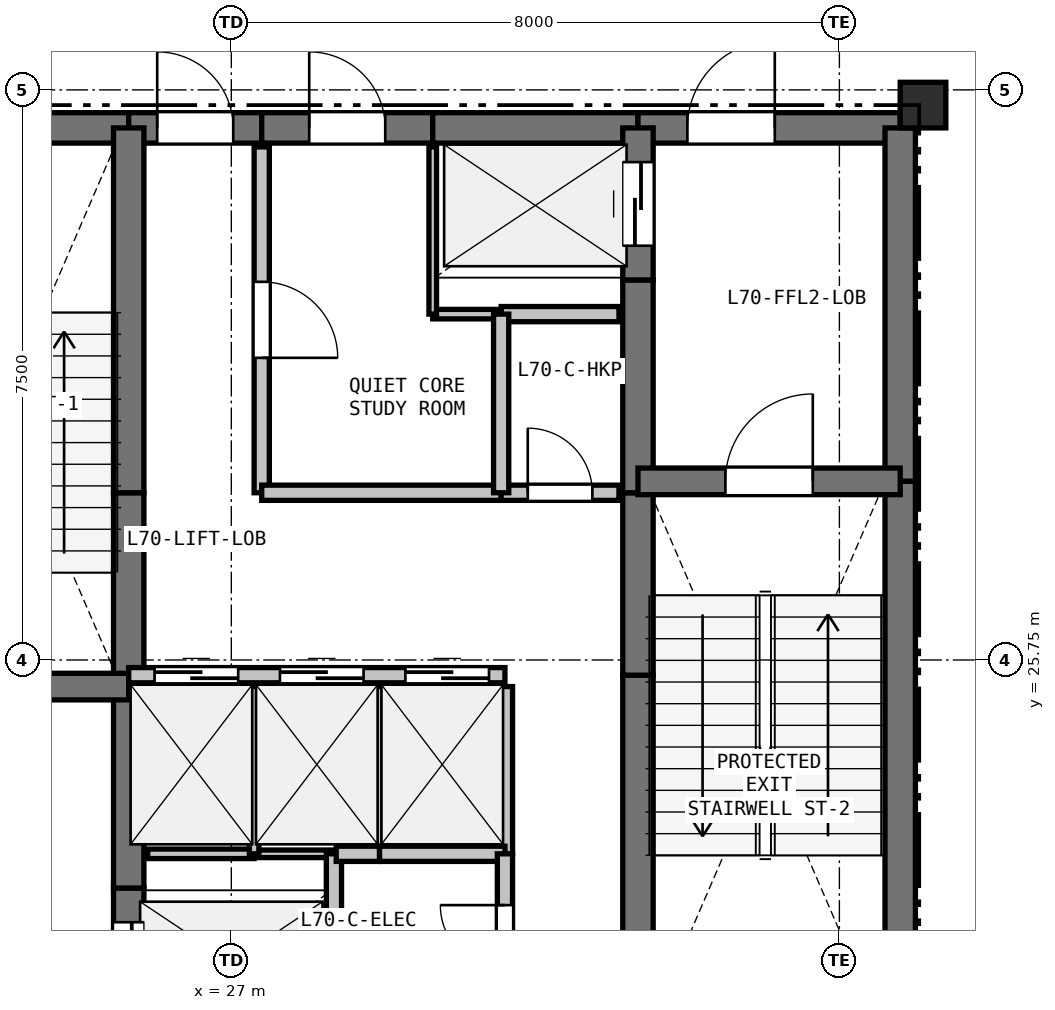
"""IFC4 building model, lengths in metres.
Left out: names, types, materials, properties, quantities, classifications, styles, units other than length and angle.
Written with IfcOpenShell. Run it as: python <this file> out.ifc"""

import sys

from ifc_helpers import new_model, si_unit, direction, frame, frame_2d, origin, origin_2d, place, context, subcontext, project, spatial, rectangle, extrude, element, fill, save


model = new_model("IFC4")
c1 = context("Model", 3, precision=1e-05, world=origin(), true_north=direction((0.0, 1.0)))
c2 = subcontext(c1, "Body", "Model", "MODEL_VIEW")
j1 = project(units=[si_unit("LENGTHUNIT", "METRE"), si_unit("PLANEANGLEUNIT", "RADIAN")], contexts=[c1])
p1 = place(None, origin())
s1 = spatial("IfcSite", under=j1, at=p1, CompositionType="ELEMENT")
p2 = place(p1, origin())
s2 = spatial("IfcBuilding", under=s1, at=p2, CompositionType="ELEMENT")
p3 = place(p2, frame((0.0, 0.0, 249.6)))
s3 = spatial("IfcBuildingStorey", under=s2, at=p3, CompositionType="ELEMENT", Elevation=249.6)
p4 = place(p3, frame((36.1, 33.05, 0.0), z_axis=(0.0, 0.0, 1.0), x_axis=(1.0, 0.0, 0.0)))
e1 = element("IfcColumn", 1, at=p4, inside=s3, PredefinedType="COLUMN", context=c2, shape_type="SweptSolid", body=[
    extrude(rectangle(XDim=0.6, YDim=0.6, at=origin_2d()), origin(), (0.0, 0.0, 1.0), 4.5),
])
p5 = place(p3, frame((22.2, 32.75, 0.0), z_axis=(0.0, 0.0, 1.0), x_axis=(1.0, 0.0, 0.0)))
e2 = element("IfcWall", 2, at=p5, inside=s3, PredefinedType="SHEAR", context=c2, shape_type="SweptSolid", body=[
    extrude(rectangle(XDim=3.45, YDim=0.4, at=frame_2d((1.725, 0.0))), origin(), (0.0, 0.0, 1.0), 4.22),
])
p6 = place(p3, frame((25.65, 32.75, 0.0), z_axis=(0.0, 0.0, 1.0), x_axis=(1.0, 0.0, 0.0)))
e3 = element("IfcWall", 3, at=p6, inside=s3, PredefinedType="SHEAR", context=c2, shape_type="SweptSolid", body=[
    extrude(rectangle(XDim=1.75, YDim=0.4, at=frame_2d((0.875, 0.0))), origin(), (0.0, 0.0, 1.0), 4.22),
])
p7 = place(p6, frame((0.375, 0.0, 0.0)))
e4 = element("IfcOpeningElement", 4, at=p7, cuts=e3, PredefinedType="OPENING", context=c2, shape_type="SweptSolid", body=[
    extrude(rectangle(XDim=1.0, YDim=2.15, at=frame_2d((0.5, 1.075))), frame((0.0, 0.21, 0.0), z_axis=(0.0, -1.0, 0.0), x_axis=(1.0, 0.0, 0.0)), (0.0, 0.0, 1.0), 0.42),
])
p8 = place(p3, frame((27.4, 32.75, 0.0), z_axis=(0.0, 0.0, 1.0), x_axis=(1.0, 0.0, 0.0)))
e5 = element("IfcWall", 5, at=p8, inside=s3, PredefinedType="SHEAR", context=c2, shape_type="SweptSolid", body=[
    extrude(rectangle(XDim=2.25, YDim=0.4, at=frame_2d((1.125, 0.0))), origin(), (0.0, 0.0, 1.0), 4.22),
])
p9 = place(p8, frame((0.625, 0.0, 0.0)))
e6 = element("IfcOpeningElement", 6, at=p9, cuts=e5, PredefinedType="OPENING", context=c2, shape_type="SweptSolid", body=[
    extrude(rectangle(XDim=1.0, YDim=2.15, at=frame_2d((0.5, 1.075))), frame((0.0, 0.21, 0.0), z_axis=(0.0, -1.0, 0.0), x_axis=(1.0, 0.0, 0.0)), (0.0, 0.0, 1.0), 0.42),
])
p10 = place(p3, frame((29.65, 32.75, 0.0), z_axis=(0.0, 0.0, 1.0), x_axis=(1.0, 0.0, 0.0)))
e7 = element("IfcWall", 7, at=p10, inside=s3, PredefinedType="SHEAR", context=c2, shape_type="SweptSolid", body=[
    extrude(rectangle(XDim=2.7, YDim=0.4, at=frame_2d((1.35, 0.0))), origin(), (0.0, 0.0, 1.0), 4.22),
])
p11 = place(p3, frame((32.35, 32.75, 0.0), z_axis=(0.0, 0.0, 1.0), x_axis=(1.0, 0.0, 0.0)))
e8 = element("IfcWall", 8, at=p11, inside=s3, PredefinedType="SHEAR", context=c2, shape_type="SweptSolid", body=[
    extrude(rectangle(XDim=3.45, YDim=0.4, at=frame_2d((1.725, 0.0))), origin(), (0.0, 0.0, 1.0), 4.22),
])
p12 = place(p11, frame((0.65, 0.0, 0.0)))
e9 = element("IfcOpeningElement", 9, at=p12, cuts=e8, PredefinedType="OPENING", context=c2, shape_type="SweptSolid", body=[
    extrude(rectangle(XDim=1.15, YDim=2.15, at=frame_2d((0.575, 1.075))), frame((0.0, 0.21, 0.0), z_axis=(0.0, -1.0, 0.0), x_axis=(1.0, 0.0, 0.0)), (0.0, 0.0, 1.0), 0.42),
])
p13 = place(p3, frame((35.8, 32.75, 0.0), z_axis=(0.0, 0.0, 1.0), x_axis=(0.0, -1.0, 0.0)))
e10 = element("IfcWall", 10, at=p13, inside=s3, PredefinedType="SHEAR", context=c2, shape_type="SweptSolid", body=[
    extrude(rectangle(XDim=4.65, YDim=0.4, at=frame_2d((2.325, 0.0))), origin(), (0.0, 0.0, 1.0), 4.22),
])
p14 = place(p3, frame((35.8, 28.1, 0.0), z_axis=(0.0, 0.0, 1.0), x_axis=(0.0, -1.0, 0.0)))
e11 = element("IfcWall", 11, at=p14, inside=s3, PredefinedType="SHEAR", context=c2, shape_type="SweptSolid", body=[
    extrude(rectangle(XDim=7.35, YDim=0.4, at=frame_2d((3.675, 0.0))), origin(), (0.0, 0.0, 1.0), 4.22),
])
p15 = place(p3, frame((25.65, 20.75, 0.0), z_axis=(0.0, 0.0, 1.0), x_axis=(0.0, 1.0, 0.0)))
e12 = element("IfcWall", 12, at=p15, inside=s3, PredefinedType="SHEAR", context=c2, shape_type="SweptSolid", body=[
    extrude(rectangle(XDim=2.0, YDim=0.4, at=frame_2d((1.0, 0.0))), origin(), (0.0, 0.0, 1.0), 4.22),
])
p16 = place(p15, frame((0.45, 0.0, 0.0)))
e13 = element("IfcOpeningElement", 13, at=p16, cuts=e12, PredefinedType="OPENING", context=c2, shape_type="SweptSolid", body=[
    extrude(rectangle(XDim=1.1, YDim=2.15, at=frame_2d((0.55, 1.075))), frame((0.0, 0.21, 0.0), z_axis=(0.0, -1.0, 0.0), x_axis=(1.0, 0.0, 0.0)), (0.0, 0.0, 1.0), 0.42),
])
p17 = place(p3, frame((25.65, 22.75, 0.0), z_axis=(0.0, 0.0, 1.0), x_axis=(0.0, 1.0, 0.0)))
e14 = element("IfcWall", 14, at=p17, inside=s3, PredefinedType="SHEAR", context=c2, shape_type="SweptSolid", body=[
    extrude(rectangle(XDim=2.8, YDim=0.4, at=frame_2d((1.4, 0.0))), origin(), (0.0, 0.0, 1.0), 4.22),
])
p18 = place(p3, frame((25.65, 25.55, 0.0), z_axis=(0.0, 0.0, 1.0), x_axis=(0.0, 1.0, 0.0)))
e15 = element("IfcWall", 15, at=p18, inside=s3, PredefinedType="SHEAR", context=c2, shape_type="SweptSolid", body=[
    extrude(rectangle(XDim=2.4, YDim=0.4, at=frame_2d((1.2, 0.0))), origin(), (0.0, 0.0, 1.0), 4.22),
])
for number, where, z_axis, x_axis in (
    (16, (25.65, 27.95, 0.0), (0.0, 0.0, 1.0), (0.0, 1.0, 0.0)),
    (17, (32.35, 20.75, 0.0), (0.0, 0.0, 1.0), (0.0, 1.0, 0.0)),
):
    element("IfcWall", number, at=place(p3, frame(where, z_axis=z_axis, x_axis=x_axis)), inside=s3, PredefinedType="SHEAR", context=c2, shape_type="SweptSolid", body=[
        extrude(rectangle(XDim=4.8, YDim=0.4, at=frame_2d((2.4, 0.0))), origin(), (0.0, 0.0, 1.0), 4.22),
    ])
p19 = place(p3, frame((32.35, 25.55, 0.0), z_axis=(0.0, 0.0, 1.0), x_axis=(0.0, 1.0, 0.0)))
e18 = element("IfcWall", 18, at=p19, inside=s3, PredefinedType="SHEAR", context=c2, shape_type="SweptSolid", body=[
    extrude(rectangle(XDim=2.4, YDim=0.4, at=frame_2d((1.2, 0.0))), origin(), (0.0, 0.0, 1.0), 4.22),
])
p20 = place(p3, frame((32.35, 27.95, 0.0), z_axis=(0.0, 0.0, 1.0), x_axis=(0.0, 1.0, 0.0)))
e19 = element("IfcWall", 19, at=p20, inside=s3, PredefinedType="SHEAR", context=c2, shape_type="SweptSolid", body=[
    extrude(rectangle(XDim=2.8, YDim=0.4, at=frame_2d((1.4, 0.0))), origin(), (0.0, 0.0, 1.0), 4.22),
])
p21 = place(p3, frame((32.35, 30.75, 0.0), z_axis=(0.0, 0.0, 1.0), x_axis=(0.0, 1.0, 0.0)))
e20 = element("IfcWall", 20, at=p21, inside=s3, PredefinedType="SHEAR", context=c2, shape_type="SweptSolid", body=[
    extrude(rectangle(XDim=2.0, YDim=0.4, at=frame_2d((1.0, 0.0))), origin(), (0.0, 0.0, 1.0), 4.22),
])
p22 = place(p21, frame((0.45, 0.0, 0.0)))
e21 = element("IfcOpeningElement", 21, at=p22, cuts=e20, PredefinedType="OPENING", context=c2, shape_type="SweptSolid", body=[
    extrude(rectangle(XDim=1.1, YDim=2.15, at=frame_2d((0.55, 1.075))), frame((0.0, 0.21, 0.0), z_axis=(0.0, -1.0, 0.0), x_axis=(1.0, 0.0, 0.0)), (0.0, 0.0, 1.0), 0.42),
])
p23 = place(p3, frame((22.2, 25.4, 0.0), z_axis=(0.0, 0.0, 1.0), x_axis=(1.0, 0.0, 0.0)))
e22 = element("IfcWall", 22, at=p23, inside=s3, PredefinedType="SHEAR", context=c2, shape_type="SweptSolid", body=[
    extrude(rectangle(XDim=3.45, YDim=0.35, at=frame_2d((1.725, 0.0))), origin(), (0.0, 0.0, 1.0), 4.22),
])
p24 = place(p23, frame((1.15, 0.0, 0.0)))
e23 = element("IfcOpeningElement", 23, at=p24, cuts=e22, PredefinedType="OPENING", context=c2, shape_type="SweptSolid", body=[
    extrude(rectangle(XDim=1.15, YDim=2.15, at=frame_2d((0.575, 1.075))), frame((0.0, 0.185, 0.0), z_axis=(0.0, -1.0, 0.0), x_axis=(1.0, 0.0, 0.0)), (0.0, 0.0, 1.0), 0.37),
])
p25 = place(p3, frame((32.35, 28.1, 0.0), z_axis=(0.0, 0.0, 1.0), x_axis=(1.0, 0.0, 0.0)))
e24 = element("IfcWall", 24, at=p25, inside=s3, PredefinedType="SHEAR", context=c2, shape_type="SweptSolid", body=[
    extrude(rectangle(XDim=3.45, YDim=0.35, at=frame_2d((1.725, 0.0))), origin(), (0.0, 0.0, 1.0), 4.22),
])
p26 = place(p25, frame((1.15, 0.0, 0.0)))
e25 = element("IfcOpeningElement", 25, at=p26, cuts=e24, PredefinedType="OPENING", context=c2, shape_type="SweptSolid", body=[
    extrude(rectangle(XDim=1.15, YDim=2.15, at=frame_2d((0.575, 1.075))), frame((0.0, 0.185, 0.0), z_axis=(0.0, -1.0, 0.0), x_axis=(1.0, 0.0, 0.0)), (0.0, 0.0, 1.0), 0.37),
])
p27 = place(p3, frame((25.65, 25.55, 0.0), z_axis=(0.0, 0.0, 1.0), x_axis=(1.0, 0.0, 0.0)))
e26 = element("IfcWall", 26, at=p27, inside=s3, PredefinedType="PARTITIONING", context=c2, shape_type="SweptSolid", body=[
    extrude(rectangle(XDim=4.95, YDim=0.2, at=frame_2d((2.475, 0.0))), origin(), (0.0, 0.0, 1.0), 4.22),
])
p28 = place(p27, frame((0.34, 0.0, 0.0)))
e27 = element("IfcOpeningElement", 27, at=p28, cuts=e26, PredefinedType="OPENING", context=c2, shape_type="SweptSolid", body=[
    extrude(rectangle(XDim=1.1, YDim=2.15, at=frame_2d((0.55, 1.075))), frame((0.0, 0.11, 0.0), z_axis=(0.0, -1.0, 0.0), x_axis=(1.0, 0.0, 0.0)), (0.0, 0.0, 1.0), 0.22),
])
p29 = place(p27, frame((1.99, 0.0, 0.0)))
e28 = element("IfcOpeningElement", 28, at=p29, cuts=e26, PredefinedType="OPENING", context=c2, shape_type="SweptSolid", body=[
    extrude(rectangle(XDim=1.1, YDim=2.15, at=frame_2d((0.55, 1.075))), frame((0.0, 0.11, 0.0), z_axis=(0.0, -1.0, 0.0), x_axis=(1.0, 0.0, 0.0)), (0.0, 0.0, 1.0), 0.22),
])
p30 = place(p27, frame((3.64, 0.0, 0.0)))
e29 = element("IfcOpeningElement", 29, at=p30, cuts=e26, PredefinedType="OPENING", context=c2, shape_type="SweptSolid", body=[
    extrude(rectangle(XDim=1.1, YDim=2.15, at=frame_2d((0.55, 1.075))), frame((0.0, 0.11, 0.0), z_axis=(0.0, -1.0, 0.0), x_axis=(1.0, 0.0, 0.0)), (0.0, 0.0, 1.0), 0.22),
])
p31 = place(p3, frame((25.9, 23.2, 0.0), z_axis=(0.0, 0.0, 1.0), x_axis=(1.0, 0.0, 0.0)))
e30 = element("IfcWall", 30, at=p31, inside=s3, PredefinedType="PARTITIONING", context=c2, shape_type="SweptSolid", body=[
    extrude(rectangle(XDim=1.4, YDim=0.125, at=frame_2d((0.7, 0.0))), origin(), (0.0, 0.0, 1.0), 4.22),
])
p32 = place(p3, frame((27.3, 23.2, 0.0), z_axis=(0.0, 0.0, 1.0), x_axis=(1.0, 0.0, 0.0)))
e31 = element("IfcWall", 31, at=p32, inside=s3, PredefinedType="PARTITIONING", context=c2, shape_type="SweptSolid", body=[
    extrude(rectangle(XDim=1.05, YDim=0.1, at=frame_2d((0.525, 0.0))), origin(), (0.0, 0.0, 1.0), 4.22),
])
p33 = place(p3, frame((28.35, 23.2, 0.0), z_axis=(0.0, 0.0, 1.0), x_axis=(0.0, -1.0, 0.0)))
e32 = element("IfcWall", 32, at=p33, inside=s3, PredefinedType="PARTITIONING", context=c2, shape_type="SweptSolid", body=[
    extrude(rectangle(XDim=2.2, YDim=0.2, at=frame_2d((1.1, 0.0))), origin(), (0.0, 0.0, 1.0), 4.22),
])
p34 = place(p3, frame((32.1, 30.3, 0.0), z_axis=(0.0, 0.0, 1.0), x_axis=(-1.0, 0.0, 0.0)))
e33 = element("IfcWall", 33, at=p34, inside=s3, PredefinedType="PARTITIONING", context=c2, shape_type="SweptSolid", body=[
    extrude(rectangle(XDim=1.55, YDim=0.2, at=frame_2d((0.775, 0.0))), origin(), (0.0, 0.0, 1.0), 4.22),
])
p35 = place(p3, frame((30.55, 30.3, 0.0), z_axis=(0.0, 0.0, 1.0), x_axis=(-1.0, 0.0, 0.0)))
e34 = element("IfcWall", 34, at=p35, inside=s3, PredefinedType="PARTITIONING", context=c2, shape_type="SweptSolid", body=[
    extrude(rectangle(XDim=0.9, YDim=0.125, at=frame_2d((0.45, 0.0))), origin(), (0.0, 0.0, 1.0), 4.22),
])
p36 = place(p3, frame((29.65, 30.3, 0.0), z_axis=(0.0, 0.0, 1.0), x_axis=(0.0, 1.0, 0.0)))
e35 = element("IfcWall", 35, at=p36, inside=s3, PredefinedType="PARTITIONING", context=c2, shape_type="SweptSolid", body=[
    extrude(rectangle(XDim=2.2, YDim=0.1, at=frame_2d((1.1, 0.0))), origin(), (0.0, 0.0, 1.0), 4.22),
])
p37 = place(p3, frame((27.3, 25.4, 0.0), z_axis=(0.0, 0.0, 1.0), x_axis=(0.0, -1.0, 0.0)))
e36 = element("IfcWall", 36, at=p37, inside=s3, PredefinedType="PARTITIONING", context=c2, shape_type="SweptSolid", body=[
    extrude(rectangle(XDim=2.2, YDim=0.125, at=frame_2d((1.1, 0.0))), origin(), (0.0, 0.0, 1.0), 4.22),
])
p38 = place(p3, frame((28.95, 25.4, 0.0), z_axis=(0.0, 0.0, 1.0), x_axis=(0.0, -1.0, 0.0)))
e37 = element("IfcWall", 37, at=p38, inside=s3, PredefinedType="PARTITIONING", context=c2, shape_type="SweptSolid", body=[
    extrude(rectangle(XDim=2.2, YDim=0.1, at=frame_2d((1.1, 0.0))), origin(), (0.0, 0.0, 1.0), 4.22),
])
p39 = place(p3, frame((28.95, 23.2, 0.0), z_axis=(0.0, 0.0, 1.0), x_axis=(-1.0, 0.0, 0.0)))
e38 = element("IfcWall", 38, at=p39, inside=s3, PredefinedType="PARTITIONING", context=c2, shape_type="SweptSolid", body=[
    extrude(rectangle(XDim=0.57, YDim=0.2, at=frame_2d((0.285, 0.0))), origin(), (0.0, 0.0, 1.0), 4.22),
])
p40 = place(p3, frame((30.6, 25.4, 0.0), z_axis=(0.0, 0.0, 1.0), x_axis=(0.0, -1.0, 0.0)))
e39 = element("IfcWall", 39, at=p40, inside=s3, PredefinedType="PARTITIONING", context=c2, shape_type="SweptSolid", body=[
    extrude(rectangle(XDim=2.2, YDim=0.2, at=frame_2d((1.1, 0.0))), origin(), (0.0, 0.0, 1.0), 4.22),
])
p41 = place(p3, frame((30.6, 23.2, 0.0), z_axis=(0.0, 0.0, 1.0), x_axis=(-1.0, 0.0, 0.0)))
e40 = element("IfcWall", 40, at=p41, inside=s3, PredefinedType="PARTITIONING", context=c2, shape_type="SweptSolid", body=[
    extrude(rectangle(XDim=1.65, YDim=0.2, at=frame_2d((0.825, 0.0))), origin(), (0.0, 0.0, 1.0), 4.22),
])
p42 = place(p3, frame((30.6, 21.0, 0.0), z_axis=(0.0, 0.0, 1.0), x_axis=(0.0, 1.0, 0.0)))
e41 = element("IfcWall", 41, at=p42, inside=s3, PredefinedType="PARTITIONING", context=c2, shape_type="SweptSolid", body=[
    extrude(rectangle(XDim=2.2, YDim=0.2, at=frame_2d((1.1, 0.0))), origin(), (0.0, 0.0, 1.0), 4.22),
])
p43 = place(p42, frame((0.675, 0.0, 0.0)))
e42 = element("IfcOpeningElement", 42, at=p43, cuts=e41, PredefinedType="OPENING", context=c2, shape_type="SweptSolid", body=[
    extrude(rectangle(XDim=0.85, YDim=2.1, at=frame_2d((0.425, 1.05))), frame((0.0, 0.11, 0.0), z_axis=(0.0, -1.0, 0.0), x_axis=(1.0, 0.0, 0.0)), (0.0, 0.0, 1.0), 0.22),
])
p44 = place(p3, frame((27.4, 32.5, 0.0), z_axis=(0.0, 0.0, 1.0), x_axis=(0.0, -1.0, 0.0)))
e43 = element("IfcWall", 43, at=p44, inside=s3, PredefinedType="PARTITIONING", context=c2, shape_type="SweptSolid", body=[
    extrude(rectangle(XDim=4.55, YDim=0.2, at=frame_2d((2.275, 0.0))), origin(), (0.0, 0.0, 1.0), 4.22),
])
p45 = place(p44, frame((1.775, 0.0, 0.0)))
e44 = element("IfcOpeningElement", 44, at=p45, cuts=e43, PredefinedType="OPENING", context=c2, shape_type="SweptSolid", body=[
    extrude(rectangle(XDim=1.0, YDim=2.15, at=frame_2d((0.5, 1.075))), frame((0.0, 0.11, 0.0), z_axis=(0.0, -1.0, 0.0), x_axis=(1.0, 0.0, 0.0)), (0.0, 0.0, 1.0), 0.22),
])
p46 = place(p3, frame((27.4, 27.95, 0.0), z_axis=(0.0, 0.0, 1.0), x_axis=(1.0, 0.0, 0.0)))
e45 = element("IfcWall", 45, at=p46, inside=s3, PredefinedType="PARTITIONING", context=c2, shape_type="SweptSolid", body=[
    extrude(rectangle(XDim=3.15, YDim=0.2, at=frame_2d((1.575, 0.0))), origin(), (0.0, 0.0, 1.0), 4.22),
])
p47 = place(p3, frame((30.55, 27.95, 0.0), z_axis=(0.0, 0.0, 1.0), x_axis=(1.0, 0.0, 0.0)))
e46 = element("IfcWall", 46, at=p47, inside=s3, PredefinedType="PARTITIONING", context=c2, shape_type="SweptSolid", body=[
    extrude(rectangle(XDim=1.55, YDim=0.2, at=frame_2d((0.775, 0.0))), origin(), (0.0, 0.0, 1.0), 4.22),
])
p48 = place(p47, frame((0.35, 0.0, 0.0)))
e47 = element("IfcOpeningElement", 47, at=p48, cuts=e46, PredefinedType="OPENING", context=c2, shape_type="SweptSolid", body=[
    extrude(rectangle(XDim=0.85, YDim=2.1, at=frame_2d((0.425, 1.05))), frame((0.0, 0.11, 0.0), z_axis=(0.0, -1.0, 0.0), x_axis=(1.0, 0.0, 0.0)), (0.0, 0.0, 1.0), 0.22),
])
p49 = place(p3, frame((30.55, 30.3, 0.0), z_axis=(0.0, 0.0, 1.0), x_axis=(0.0, -1.0, 0.0)))
e48 = element("IfcWall", 48, at=p49, inside=s3, PredefinedType="PARTITIONING", context=c2, shape_type="SweptSolid", body=[
    extrude(rectangle(XDim=2.35, YDim=0.2, at=frame_2d((1.175, 0.0))), origin(), (0.0, 0.0, 1.0), 4.22),
])
p50 = place(p28, origin())
e49 = element("IfcDoor", 49, at=p50, inside=s3, OperationType="SLIDING_TO_LEFT", PredefinedType="DOOR", context=c2, shape_type="SweptSolid", body=[
    extrude(rectangle(XDim=1.1, YDim=2.15, at=frame_2d((0.55, 1.075))), frame((0.0, 0.025, 0.0), z_axis=(0.0, -1.0, 0.0), x_axis=(1.0, 0.0, 0.0)), (0.0, 0.0, 1.0), 0.05),
])
fill(e27, e49)
p51 = place(p29, origin())
e50 = element("IfcDoor", 50, at=p51, inside=s3, OperationType="SLIDING_TO_LEFT", PredefinedType="DOOR", context=c2, shape_type="SweptSolid", body=[
    extrude(rectangle(XDim=1.1, YDim=2.15, at=frame_2d((0.55, 1.075))), frame((0.0, 0.025, 0.0), z_axis=(0.0, -1.0, 0.0), x_axis=(1.0, 0.0, 0.0)), (0.0, 0.0, 1.0), 0.05),
])
fill(e28, e50)
p52 = place(p30, origin())
e51 = element("IfcDoor", 51, at=p52, inside=s3, OperationType="SLIDING_TO_LEFT", PredefinedType="DOOR", context=c2, shape_type="SweptSolid", body=[
    extrude(rectangle(XDim=1.1, YDim=2.15, at=frame_2d((0.55, 1.075))), frame((0.0, 0.025, 0.0), z_axis=(0.0, -1.0, 0.0), x_axis=(1.0, 0.0, 0.0)), (0.0, 0.0, 1.0), 0.05),
])
fill(e29, e51)
p53 = place(p7, origin())
e52 = element("IfcDoor", 52, at=p53, inside=s3, OperationType="SINGLE_SWING_LEFT", PredefinedType="DOOR", context=c2, shape_type="SweptSolid", body=[
    extrude(rectangle(XDim=1.0, YDim=2.15, at=frame_2d((0.5, 1.075))), frame((0.0, 0.025, 0.0), z_axis=(0.0, -1.0, 0.0), x_axis=(1.0, 0.0, 0.0)), (0.0, 0.0, 1.0), 0.05),
])
fill(e4, e52)
p54 = place(p16, origin())
e53 = element("IfcDoor", 53, at=p54, inside=s3, OperationType="SLIDING_TO_LEFT", PredefinedType="DOOR", context=c2, shape_type="SweptSolid", body=[
    extrude(rectangle(XDim=1.1, YDim=2.15, at=frame_2d((0.55, 1.075))), frame((0.0, 0.025, 0.0), z_axis=(0.0, -1.0, 0.0), x_axis=(1.0, 0.0, 0.0)), (0.0, 0.0, 1.0), 0.05),
])
fill(e13, e53)
p55 = place(p22, origin())
e54 = element("IfcDoor", 54, at=p55, inside=s3, OperationType="SLIDING_TO_LEFT", PredefinedType="DOOR", context=c2, shape_type="SweptSolid", body=[
    extrude(rectangle(XDim=1.1, YDim=2.15, at=frame_2d((0.55, 1.075))), frame((0.0, 0.025, 0.0), z_axis=(0.0, -1.0, 0.0), x_axis=(1.0, 0.0, 0.0)), (0.0, 0.0, 1.0), 0.05),
])
fill(e21, e54)
p56 = place(p26, origin())
e55 = element("IfcDoor", 55, at=p56, inside=s3, OperationType="SINGLE_SWING_RIGHT", PredefinedType="DOOR", context=c2, shape_type="SweptSolid", body=[
    extrude(rectangle(XDim=1.15, YDim=2.15, at=frame_2d((0.575, 1.075))), frame((0.0, 0.025, 0.0), z_axis=(0.0, -1.0, 0.0), x_axis=(1.0, 0.0, 0.0)), (0.0, 0.0, 1.0), 0.05),
])
fill(e25, e55)
p57 = place(p12, origin())
e56 = element("IfcDoor", 56, at=p57, inside=s3, OperationType="SINGLE_SWING_RIGHT", PredefinedType="DOOR", context=c2, shape_type="SweptSolid", body=[
    extrude(rectangle(XDim=1.15, YDim=2.15, at=frame_2d((0.575, 1.075))), frame((0.0, 0.025, 0.0), z_axis=(0.0, -1.0, 0.0), x_axis=(1.0, 0.0, 0.0)), (0.0, 0.0, 1.0), 0.05),
])
fill(e9, e56)
p58 = place(p45, origin())
e57 = element("IfcDoor", 57, at=p58, inside=s3, OperationType="SINGLE_SWING_RIGHT", PredefinedType="DOOR", context=c2, shape_type="SweptSolid", body=[
    extrude(rectangle(XDim=1.0, YDim=2.15, at=frame_2d((0.5, 1.075))), frame((0.0, 0.025, 0.0), z_axis=(0.0, -1.0, 0.0), x_axis=(1.0, 0.0, 0.0)), (0.0, 0.0, 1.0), 0.05),
])
fill(e44, e57)
p59 = place(p48, origin())
e58 = element("IfcDoor", 58, at=p59, inside=s3, OperationType="SINGLE_SWING_LEFT", PredefinedType="DOOR", context=c2, shape_type="SweptSolid", body=[
    extrude(rectangle(XDim=0.85, YDim=2.1, at=frame_2d((0.425, 1.05))), frame((0.0, 0.025, 0.0), z_axis=(0.0, -1.0, 0.0), x_axis=(1.0, 0.0, 0.0)), (0.0, 0.0, 1.0), 0.05),
])
fill(e47, e58)
p60 = place(p43, origin())
e59 = element("IfcDoor", 59, at=p60, inside=s3, OperationType="SINGLE_SWING_RIGHT", PredefinedType="DOOR", context=c2, shape_type="SweptSolid", body=[
    extrude(rectangle(XDim=0.85, YDim=2.1, at=frame_2d((0.425, 1.05))), frame((0.0, 0.025, 0.0), z_axis=(0.0, -1.0, 0.0), x_axis=(1.0, 0.0, 0.0)), (0.0, 0.0, 1.0), 0.05),
])
fill(e42, e59)
p61 = place(p9, origin())
e60 = element("IfcDoor", 60, at=p61, inside=s3, OperationType="SINGLE_SWING_LEFT", PredefinedType="DOOR", context=c2, shape_type="SweptSolid", body=[
    extrude(rectangle(XDim=1.0, YDim=2.15, at=frame_2d((0.5, 1.075))), frame((0.0, 0.025, 0.0), z_axis=(0.0, -1.0, 0.0), x_axis=(1.0, 0.0, 0.0)), (0.0, 0.0, 1.0), 0.05),
])
fill(e6, e60)
save(model, sys.argv[1])
